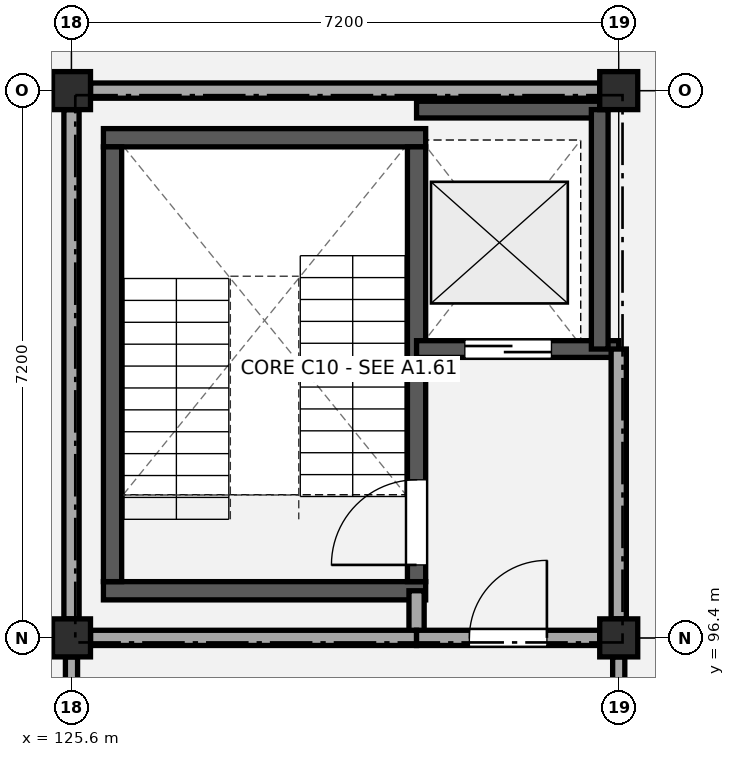
"""IFC4 building model, lengths in metres.
Left out: names, types, materials, properties, quantities, classifications, styles, units other than length and angle.
Written with IfcOpenShell. Run it as: python <this file> out.ifc"""

import sys

from ifc_helpers import new_model, si_unit, direction, frame, frame_2d, origin, origin_2d, place, context, subcontext, project, spatial, rectangle, extrude, element, fill, save


model = new_model("IFC4")
c1 = context("Model", 3, precision=1e-05, world=origin(), true_north=direction((0.0, 1.0)))
c2 = subcontext(c1, "Body", "Model", "MODEL_VIEW")
j1 = project(units=[si_unit("LENGTHUNIT", "METRE"), si_unit("PLANEANGLEUNIT", "RADIAN")], contexts=[c1])
p1 = place(None, origin())
s1 = spatial("IfcSite", under=j1, at=p1, CompositionType="ELEMENT")
p2 = place(p1, origin())
s2 = spatial("IfcBuilding", under=s1, at=p2, CompositionType="ELEMENT")
p3 = place(p2, frame((0.0, 0.0, 17.64)))
s3 = spatial("IfcBuildingStorey", under=s2, at=p3, CompositionType="ELEMENT", Elevation=17.64)
for number, where, z_axis, x_axis in (
    (1, (125.6, 96.4, 0.0), (0.0, 0.0, 1.0), (1.0, 0.0, 0.0)),
    (2, (125.6, 103.6, 0.0), (0.0, 0.0, 1.0), (1.0, 0.0, 0.0)),
    (3, (132.8, 96.4, 0.0), (0.0, 0.0, 1.0), (1.0, 0.0, 0.0)),
    (4, (132.8, 103.6, 0.0), (0.0, 0.0, 1.0), (1.0, 0.0, 0.0)),
):
    element("IfcColumn", number, at=place(p3, frame(where, z_axis=z_axis, x_axis=x_axis)), inside=s3, PredefinedType="COLUMN", context=c2, shape_type="SweptSolid", body=[
        extrude(rectangle(XDim=0.5, YDim=0.5, at=origin_2d()), origin(), (0.0, 0.0, 1.0), 3.96),
    ])
for number, where, z_axis, x_axis in (
    (5, (126.02, 97.02, 0.0), (0.0, 0.0, 1.0), (1.0, 0.0, 0.0)),
    (6, (126.02, 102.98, 0.0), (0.0, 0.0, 1.0), (1.0, 0.0, 0.0)),
):
    element("IfcWall", number, at=place(p3, frame(where, z_axis=z_axis, x_axis=x_axis)), inside=s3, PredefinedType="SHEAR", context=c2, shape_type="SweptSolid", body=[
        extrude(rectangle(XDim=4.24, YDim=0.24, at=frame_2d((2.12, 0.0))), origin(), (0.0, 0.0, 1.0), 3.7),
    ])
p4 = place(p3, frame((126.14, 97.14, 0.0), z_axis=(0.0, 0.0, 1.0), x_axis=(0.0, 1.0, 0.0)))
e7 = element("IfcWall", 7, at=p4, inside=s3, PredefinedType="SHEAR", context=c2, shape_type="SweptSolid", body=[
    extrude(rectangle(XDim=5.72, YDim=0.24, at=frame_2d((2.86, 0.0))), origin(), (0.0, 0.0, 1.0), 3.7),
])
p5 = place(p3, frame((130.14, 97.14, 0.0), z_axis=(0.0, 0.0, 1.0), x_axis=(0.0, 1.0, 0.0)))
e8 = element("IfcWall", 8, at=p5, inside=s3, PredefinedType="SHEAR", context=c2, shape_type="SweptSolid", body=[
    extrude(rectangle(XDim=5.72, YDim=0.24, at=frame_2d((2.86, 0.0))), origin(), (0.0, 0.0, 1.0), 3.7),
])
p6 = place(p5, frame((0.22, 0.0, 0.0)))
e9 = element("IfcOpeningElement", 9, at=p6, cuts=e8, PredefinedType="OPENING", context=c2, shape_type="SweptSolid", body=[
    extrude(rectangle(XDim=1.12, YDim=2.15, at=frame_2d((0.56, 1.075))), frame((0.0, 0.13, 0.0), z_axis=(0.0, -1.0, 0.0), x_axis=(1.0, 0.0, 0.0)), (0.0, 0.0, 1.0), 0.26),
])
p7 = place(p3, frame((130.14, 100.2, 0.0), z_axis=(0.0, 0.0, 1.0), x_axis=(1.0, 0.0, 0.0)))
e10 = element("IfcWall", 10, at=p7, inside=s3, PredefinedType="SHEAR", context=c2, shape_type="SweptSolid", body=[
    extrude(rectangle(XDim=2.66, YDim=0.22, at=frame_2d((1.33, 0.0))), origin(), (0.0, 0.0, 1.0), 3.7),
])
p8 = place(p7, frame((0.635, 0.0, 0.0)))
e11 = element("IfcOpeningElement", 11, at=p8, cuts=e10, PredefinedType="OPENING", context=c2, shape_type="SweptSolid", body=[
    extrude(rectangle(XDim=1.14, YDim=2.15, at=frame_2d((0.57, 1.075))), frame((0.0, 0.12, 0.0), z_axis=(0.0, -1.0, 0.0), x_axis=(1.0, 0.0, 0.0)), (0.0, 0.0, 1.0), 0.24),
])
p9 = place(p3, frame((130.14, 103.35, 0.0), z_axis=(0.0, 0.0, 1.0), x_axis=(1.0, 0.0, 0.0)))
e12 = element("IfcWall", 12, at=p9, inside=s3, PredefinedType="SHEAR", context=c2, shape_type="SweptSolid", body=[
    extrude(rectangle(XDim=2.41, YDim=0.22, at=frame_2d((1.205, 0.0))), origin(), (0.0, 0.0, 1.0), 3.7),
])
p10 = place(p3, frame((132.55, 100.2, 0.0), z_axis=(0.0, 0.0, 1.0), x_axis=(0.0, 1.0, 0.0)))
e13 = element("IfcWall", 13, at=p10, inside=s3, PredefinedType="SHEAR", context=c2, shape_type="SweptSolid", body=[
    extrude(rectangle(XDim=3.15, YDim=0.22, at=frame_2d((1.575, 0.0))), origin(), (0.0, 0.0, 1.0), 3.7),
])
p11 = place(p3, frame((130.14, 96.4, 0.0), z_axis=(0.0, 0.0, 1.0), x_axis=(0.0, 1.0, 0.0)))
e14 = element("IfcWall", 14, at=p11, inside=s3, PredefinedType="PARTITIONING", context=c2, shape_type="SweptSolid", body=[
    extrude(rectangle(XDim=0.62, YDim=0.2, at=frame_2d((0.31, 0.0))), origin(), (0.0, 0.0, 1.0), 3.04),
])
p12 = place(p3, frame((125.6, 96.65, 0.0), z_axis=(0.0, 0.0, 1.0), x_axis=(0.0, 1.0, 0.0)))
e15 = element("IfcWall", 15, at=p12, inside=s3, PredefinedType="PARTITIONING", context=c2, shape_type="SweptSolid", body=[
    extrude(rectangle(XDim=6.7, YDim=0.2, at=frame_2d((3.35, 0.0))), origin(), (0.0, 0.0, 1.0), 3.07),
])
p13 = place(p3, frame((132.8, 96.65, 0.0), z_axis=(0.0, 0.0, 1.0), x_axis=(0.0, 1.0, 0.0)))
e16 = element("IfcWall", 16, at=p13, inside=s3, PredefinedType="PARTITIONING", context=c2, shape_type="SweptSolid", body=[
    extrude(rectangle(XDim=3.55, YDim=0.2, at=frame_2d((1.775, 0.0))), origin(), (0.0, 0.0, 1.0), 3.07),
])
p14 = place(p3, frame((125.85, 96.4, 0.0), z_axis=(0.0, 0.0, 1.0), x_axis=(1.0, 0.0, 0.0)))
e17 = element("IfcWall", 17, at=p14, inside=s3, PredefinedType="PARTITIONING", context=c2, shape_type="SweptSolid", body=[
    extrude(rectangle(XDim=4.29, YDim=0.2, at=frame_2d((2.145, 0.0))), origin(), (0.0, 0.0, 1.0), 3.04),
])
p15 = place(p3, frame((130.14, 96.4, 0.0), z_axis=(0.0, 0.0, 1.0), x_axis=(1.0, 0.0, 0.0)))
e18 = element("IfcWall", 18, at=p15, inside=s3, PredefinedType="PARTITIONING", context=c2, shape_type="SweptSolid", body=[
    extrude(rectangle(XDim=2.41, YDim=0.2, at=frame_2d((1.205, 0.0))), origin(), (0.0, 0.0, 1.0), 3.04),
])
p16 = place(p15, frame((0.695, 0.0, 0.0)))
e19 = element("IfcOpeningElement", 19, at=p16, cuts=e18, PredefinedType="OPENING", context=c2, shape_type="SweptSolid", body=[
    extrude(rectangle(XDim=1.02, YDim=2.15, at=frame_2d((0.51, 1.075))), frame((0.0, 0.11, 0.0), z_axis=(0.0, -1.0, 0.0), x_axis=(1.0, 0.0, 0.0)), (0.0, 0.0, 1.0), 0.22),
])
p17 = place(p3, frame((125.85, 103.6, 0.0), z_axis=(0.0, 0.0, 1.0), x_axis=(1.0, 0.0, 0.0)))
e20 = element("IfcWall", 20, at=p17, inside=s3, PredefinedType="PARTITIONING", context=c2, shape_type="SweptSolid", body=[
    extrude(rectangle(XDim=6.7, YDim=0.2, at=frame_2d((3.35, 0.0))), origin(), (0.0, 0.0, 1.0), 3.09),
])
p18 = place(p3, frame((125.6, 89.45, 0.0), z_axis=(0.0, 0.0, 1.0), x_axis=(0.0, 1.0, 0.0)))
e21 = element("IfcWall", 21, at=p18, inside=s3, PredefinedType="PARTITIONING", context=c2, shape_type="SweptSolid", body=[
    extrude(rectangle(XDim=6.7, YDim=0.16, at=frame_2d((3.35, 0.0))), origin(), (0.0, 0.0, 1.0), 3.02),
])
p19 = place(p18, frame((2.81, 0.0, 0.0)))
e22 = element("IfcOpeningElement", 22, at=p19, cuts=e21, PredefinedType="OPENING", context=c2, shape_type="SweptSolid", body=[
    extrude(rectangle(XDim=1.08, YDim=2.16, at=frame_2d((0.54, 1.08))), frame((0.0, 0.09, 0.0), z_axis=(0.0, -1.0, 0.0), x_axis=(1.0, 0.0, 0.0)), (0.0, 0.0, 1.0), 0.18),
])
p20 = place(p3, frame((132.8, 89.45, 0.0), z_axis=(0.0, 0.0, 1.0), x_axis=(0.0, 1.0, 0.0)))
e23 = element("IfcWall", 23, at=p20, inside=s3, PredefinedType="PARTITIONING", context=c2, shape_type="SweptSolid", body=[
    extrude(rectangle(XDim=6.7, YDim=0.16, at=frame_2d((3.35, 0.0))), origin(), (0.0, 0.0, 1.0), 3.02),
])
p21 = place(p6, origin())
e24 = element("IfcDoor", 24, at=p21, inside=s3, OperationType="SINGLE_SWING_LEFT", PredefinedType="DOOR", context=c2, shape_type="SweptSolid", body=[
    extrude(rectangle(XDim=1.12, YDim=2.15, at=frame_2d((0.56, 1.075))), frame((0.0, 0.025, 0.0), z_axis=(0.0, -1.0, 0.0), x_axis=(1.0, 0.0, 0.0)), (0.0, 0.0, 1.0), 0.05),
])
fill(e9, e24)
p22 = place(p8, origin())
e25 = element("IfcDoor", 25, at=p22, inside=s3, OperationType="SLIDING_TO_LEFT", PredefinedType="DOOR", context=c2, shape_type="SweptSolid", body=[
    extrude(rectangle(XDim=1.14, YDim=2.15, at=frame_2d((0.57, 1.075))), frame((0.0, 0.025, 0.0), z_axis=(0.0, -1.0, 0.0), x_axis=(1.0, 0.0, 0.0)), (0.0, 0.0, 1.0), 0.05),
])
fill(e11, e25)
p23 = place(p16, origin())
e26 = element("IfcDoor", 26, at=p23, inside=s3, OperationType="SINGLE_SWING_RIGHT", PredefinedType="DOOR", context=c2, shape_type="SweptSolid", body=[
    extrude(rectangle(XDim=1.02, YDim=2.15, at=frame_2d((0.51, 1.075))), frame((0.0, 0.025, 0.0), z_axis=(0.0, -1.0, 0.0), x_axis=(1.0, 0.0, 0.0)), (0.0, 0.0, 1.0), 0.05),
])
fill(e19, e26)
save(model, sys.argv[1])
